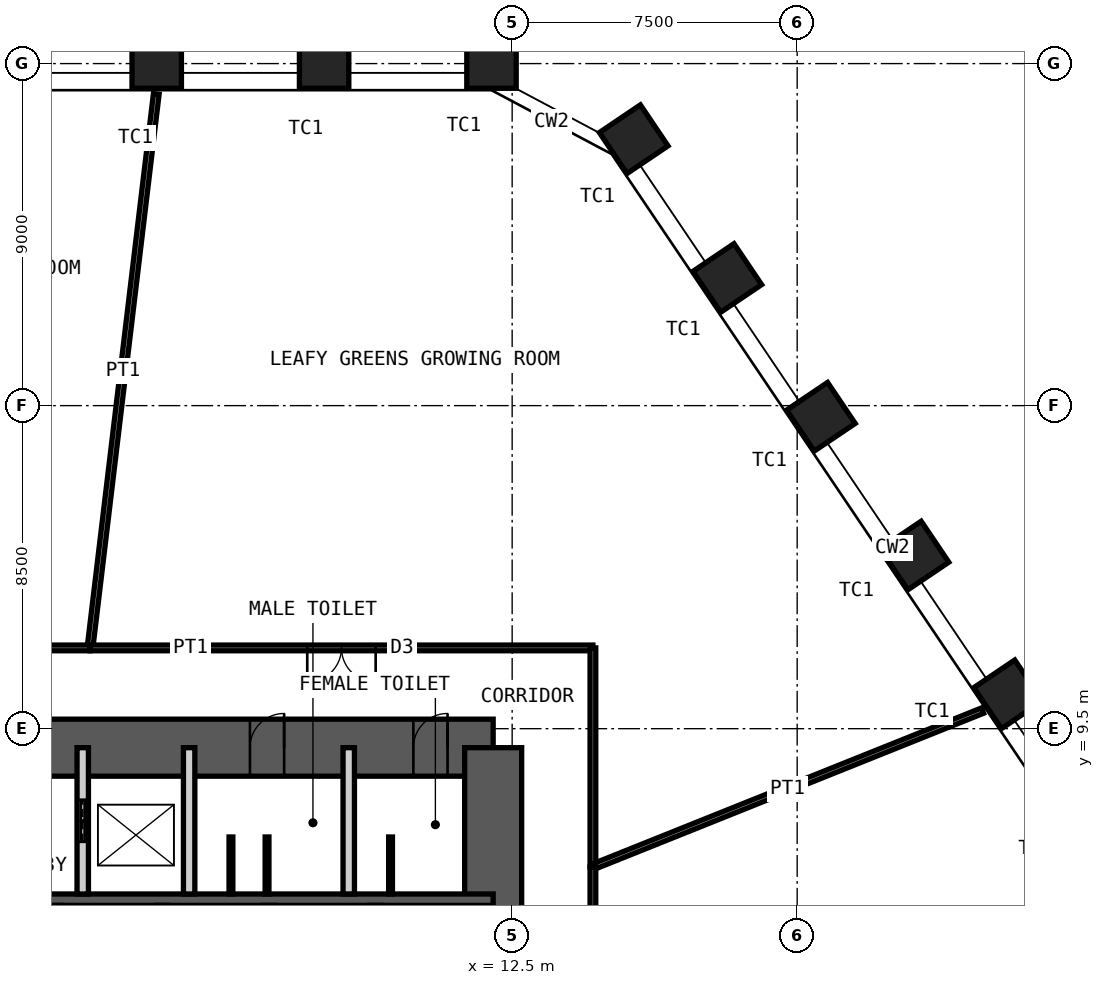
"""IFC4 building model, lengths in metres.
Left out: names, types, materials, properties, quantities, classifications, styles, units other than length and angle.
Written with IfcOpenShell. Run it as: python <this file> out.ifc"""

import sys

from ifc_helpers import new_model, si_unit, direction, frame, frame_2d, origin, origin_2d, place, context, subcontext, project, spatial, rectangle, hollow_rectangle, extrude, element, fill, save


model = new_model("IFC4")
c1 = context("Model", 3, precision=1e-05, world=origin(), true_north=direction((0.0, 1.0)))
c2 = subcontext(c1, "Body", "Model", "MODEL_VIEW")
j1 = project(units=[si_unit("LENGTHUNIT", "METRE"), si_unit("PLANEANGLEUNIT", "RADIAN")], contexts=[c1])
p1 = place(None, origin())
s1 = spatial("IfcSite", under=j1, at=p1, CompositionType="ELEMENT")
p2 = place(p1, origin())
s2 = spatial("IfcBuilding", under=s1, at=p2, CompositionType="ELEMENT")
p3 = place(p2, frame((0.0, 0.0, 37.0)))
s3 = spatial("IfcBuildingStorey", under=s2, at=p3, CompositionType="ELEMENT", Elevation=37.0)
for number, where, z_axis, x_axis in (
    (1, (3.147, 27.0, 0.0), (0.0, 0.0, 1.0), (-1.0, 0.0, 0.0)),
    (2, (7.552, 27.0, 0.0), (0.0, 0.0, 1.0), (-1.0, 0.0, 0.0)),
    (3, (11.956, 27.0, 0.0), (0.0, 0.0, 1.0), (-1.0, 0.0, 0.0)),
    (4, (15.698, 25.01, 0.0), (0.0, 0.0, 1.0), (-0.559, 0.829, 0.0)),
    (5, (18.161, 21.359, 0.0), (0.0, 0.0, 1.0), (-0.559, 0.829, 0.0)),
    (6, (20.624, 17.707, 0.0), (0.0, 0.0, 1.0), (-0.559, 0.829, 0.0)),
    (7, (23.087, 14.056, 0.0), (0.0, 0.0, 1.0), (-0.559, 0.829, 0.0)),
    (8, (25.55, 10.404, 0.0), (0.0, 0.0, 1.0), (-0.559, 0.829, 0.0)),
):
    element("IfcColumn", number, at=place(p3, frame(where, z_axis=z_axis, x_axis=x_axis)), inside=s3, PredefinedType="COLUMN", context=c2, shape_type="SweptSolid", body=[
        extrude(hollow_rectangle(XDim=1.3, YDim=1.3, WallThickness=0.1, at=origin_2d()), origin(), (0.0, 0.0, 1.0), 5.0),
    ])
p4 = place(p3, frame((-12.0, 9.0, 0.0), z_axis=(0.0, 0.0, 1.0), x_axis=(1.0, 0.0, 0.0)))
e9 = element("IfcWall", 9, at=p4, inside=s3, PredefinedType="SHEAR", context=c2, shape_type="SweptSolid", body=[
    extrude(rectangle(XDim=24.0, YDim=1.5, at=frame_2d((12.0, 0.0))), origin(), (0.0, 0.0, 1.0), 5.0),
])
p5 = place(p4, frame((10.4, 0.0, 0.0)))
e10 = element("IfcOpeningElement", 10, at=p5, cuts=e9, PredefinedType="OPENING", context=c2, shape_type="SweptSolid", body=[
    extrude(rectangle(XDim=1.0, YDim=2.1, at=frame_2d((0.5, 1.05))), frame((0.0, 0.76, 0.0), z_axis=(0.0, -1.0, 0.0), x_axis=(1.0, 0.0, 0.0)), (0.0, 0.0, 1.0), 1.52),
])
p6 = place(p4, frame((17.6, 0.0, 0.0)))
e11 = element("IfcOpeningElement", 11, at=p6, cuts=e9, PredefinedType="OPENING", context=c2, shape_type="SweptSolid", body=[
    extrude(rectangle(XDim=0.9, YDim=2.1, at=frame_2d((0.45, 1.05))), frame((0.0, 0.76, 0.0), z_axis=(0.0, -1.0, 0.0), x_axis=(1.0, 0.0, 0.0)), (0.0, 0.0, 1.0), 1.52),
])
p7 = place(p4, frame((21.9, 0.0, 0.0)))
e12 = element("IfcOpeningElement", 12, at=p7, cuts=e9, PredefinedType="OPENING", context=c2, shape_type="SweptSolid", body=[
    extrude(rectangle(XDim=0.9, YDim=2.1, at=frame_2d((0.45, 1.05))), frame((0.0, 0.76, 0.0), z_axis=(0.0, -1.0, 0.0), x_axis=(1.0, 0.0, 0.0)), (0.0, 0.0, 1.0), 1.52),
])
p8 = place(p3, frame((12.0, -9.0, 0.0), z_axis=(0.0, 0.0, 1.0), x_axis=(0.0, 1.0, 0.0)))
e13 = element("IfcWall", 13, at=p8, inside=s3, PredefinedType="SHEAR", context=c2, shape_type="SweptSolid", body=[
    extrude(rectangle(XDim=18.0, YDim=1.5, at=frame_2d((9.0, 0.0))), origin(), (0.0, 0.0, 1.0), 5.0),
])
p9 = place(p8, frame((8.1, 0.0, 0.0)))
e14 = element("IfcOpeningElement", 14, at=p9, cuts=e13, PredefinedType="OPENING", context=c2, shape_type="SweptSolid", body=[
    extrude(rectangle(XDim=1.8, YDim=2.1, at=frame_2d((0.9, 1.05))), frame((0.0, 0.76, 0.0), z_axis=(0.0, -1.0, 0.0), x_axis=(1.0, 0.0, 0.0)), (0.0, 0.0, 1.0), 1.52),
])
p10 = place(p3, frame((-12.0, 5.0, 0.0), z_axis=(0.0, 0.0, 1.0), x_axis=(1.0, 0.0, 0.0)))
e15 = element("IfcWall", 15, at=p10, inside=s3, PredefinedType="SHEAR", context=c2, shape_type="SweptSolid", body=[
    extrude(rectangle(XDim=24.0, YDim=0.3, at=frame_2d((12.0, 0.0))), origin(), (0.0, 0.0, 1.0), 5.0),
])
p11 = place(p3, frame((1.2, 5.15, 0.0), z_axis=(0.0, 0.0, 1.0), x_axis=(0.0, 1.0, 0.0)))
e16 = element("IfcWall", 16, at=p11, inside=s3, PredefinedType="PARTITIONING", context=c2, shape_type="SweptSolid", body=[
    extrude(rectangle(XDim=3.85, YDim=0.3, at=frame_2d((1.925, 0.0))), origin(), (0.0, 0.0, 1.0), 4.78),
])
p12 = place(p11, frame((1.375, 0.0, 0.0)))
e17 = element("IfcOpeningElement", 17, at=p12, cuts=e16, PredefinedType="OPENING", context=c2, shape_type="SweptSolid", body=[
    extrude(rectangle(XDim=1.1, YDim=2.4, at=frame_2d((0.55, 1.2))), frame((0.0, 0.16, 0.0), z_axis=(0.0, -1.0, 0.0), x_axis=(1.0, 0.0, 0.0)), (0.0, 0.0, 1.0), 0.32),
])
for number, where, z_axis, x_axis in (
    (18, (4.0, 5.15, 0.0), (0.0, 0.0, 1.0), (0.0, 1.0, 0.0)),
    (19, (8.2, 5.15, 0.0), (0.0, 0.0, 1.0), (0.0, 1.0, 0.0)),
):
    element("IfcWall", number, at=place(p3, frame(where, z_axis=z_axis, x_axis=x_axis)), inside=s3, PredefinedType="PARTITIONING", context=c2, shape_type="SweptSolid", body=[
        extrude(rectangle(XDim=3.85, YDim=0.3, at=frame_2d((1.925, 0.0))), origin(), (0.0, 0.0, 1.0), 4.78),
    ])
for number, where, z_axis, x_axis in (
    (20, (5.1, 5.15, 0.0), (0.0, 0.0, 1.0), (0.0, 1.0, 0.0)),
    (21, (6.05, 5.15, 0.0), (0.0, 0.0, 1.0), (0.0, 1.0, 0.0)),
    (22, (9.3, 5.15, 0.0), (0.0, 0.0, 1.0), (0.0, 1.0, 0.0)),
):
    element("IfcWall", number, at=place(p3, frame(where, z_axis=z_axis, x_axis=x_axis)), inside=s3, PredefinedType="PARTITIONING", context=c2, shape_type="SweptSolid", body=[
        extrude(rectangle(XDim=1.5, YDim=0.1, at=frame_2d((0.75, 0.0))), origin(), (0.0, 0.0, 1.0), 2.1),
    ])
p13 = place(p3, frame((3.135, 26.201, 0.0), z_axis=(0.0, 0.0, 1.0), x_axis=(-0.118796980211, -0.992918565388, 0.0)))
e23 = element("IfcWall", 23, at=p13, inside=s3, PredefinedType="PARTITIONING", context=c2, shape_type="SweptSolid", body=[
    extrude(rectangle(XDim=14.68, YDim=0.15, at=frame_2d((7.34, 0.0))), origin(), (0.0, 0.0, 1.0), 3.7),
])
p14 = place(p3, frame((1.391, 11.625, 0.0), z_axis=(0.0, 0.0, 1.0), x_axis=(1.0, 0.0, 0.0)))
e24 = element("IfcWall", 24, at=p14, inside=s3, PredefinedType="PARTITIONING", context=c2, shape_type="SweptSolid", body=[
    extrude(rectangle(XDim=13.234, YDim=0.15, at=frame_2d((6.617, 0.0))), origin(), (0.0, 0.0, 1.0), 4.8),
])
p15 = place(p14, frame((5.717, 0.0, 0.0)))
e25 = element("IfcOpeningElement", 25, at=p15, cuts=e24, PredefinedType="OPENING", context=c2, shape_type="SweptSolid", body=[
    extrude(rectangle(XDim=1.8, YDim=2.4, at=frame_2d((0.9, 1.2))), frame((0.0, 0.085, 0.0), z_axis=(0.0, -1.0, 0.0), x_axis=(1.0, 0.0, 0.0)), (0.0, 0.0, 1.0), 0.17),
])
p16 = place(p3, frame((14.625, 11.625, 0.0), z_axis=(0.0, 0.0, 1.0), x_axis=(0.0, -1.0, 0.0)))
e26 = element("IfcWall", 26, at=p16, inside=s3, PredefinedType="PARTITIONING", context=c2, shape_type="SweptSolid", body=[
    extrude(rectangle(XDim=5.761, YDim=0.15, at=frame_2d((2.88, 0.0))), origin(), (0.0, 0.0, 1.0), 4.8),
])
p17 = place(p3, frame((24.877, 9.975, 0.0), z_axis=(0.0, 0.0, 1.0), x_axis=(-0.928157765849, -0.372186998288, 0.0)))
e27 = element("IfcWall", 27, at=p17, inside=s3, PredefinedType="PARTITIONING", context=c2, shape_type="SweptSolid", body=[
    extrude(rectangle(XDim=11.046, YDim=0.15, at=frame_2d((5.523, 0.0))), origin(), (0.0, 0.0, 1.0), 3.7),
])
p18 = place(p3, frame((14.625, 5.864, 0.0), z_axis=(0.0, 0.0, 1.0), x_axis=(0.0, -1.0, 0.0)))
e28 = element("IfcWall", 28, at=p18, inside=s3, PredefinedType="PARTITIONING", context=c2, shape_type="SweptSolid", body=[
    extrude(rectangle(XDim=8.195, YDim=0.15, at=frame_2d((4.097, 0.0))), origin(), (0.0, 0.0, 1.0), 4.8),
])
p19 = place(p18, frame((3.198, 0.0, 0.0)))
e29 = element("IfcOpeningElement", 29, at=p19, cuts=e28, PredefinedType="OPENING", context=c2, shape_type="SweptSolid", body=[
    extrude(rectangle(XDim=1.8, YDim=2.4, at=frame_2d((0.9, 1.2))), frame((0.0, 0.085, 0.0), z_axis=(0.0, -1.0, 0.0), x_axis=(1.0, 0.0, 0.0)), (0.0, 0.0, 1.0), 0.17),
])
p20 = place(p3, frame((-4.45, 11.625, 0.0), z_axis=(0.0, 0.0, 1.0), x_axis=(1.0, 0.0, 0.0)))
e30 = element("IfcWall", 30, at=p20, inside=s3, PredefinedType="PARTITIONING", context=c2, shape_type="SweptSolid", body=[
    extrude(rectangle(XDim=5.841, YDim=0.15, at=frame_2d((2.92, 0.0))), origin(), (0.0, 0.0, 1.0), 4.8),
])
p21 = place(p20, frame((2.02, 0.0, 0.0)))
e31 = element("IfcOpeningElement", 31, at=p21, cuts=e30, PredefinedType="OPENING", context=c2, shape_type="SweptSolid", body=[
    extrude(rectangle(XDim=1.8, YDim=2.4, at=frame_2d((0.9, 1.2))), frame((0.0, 0.085, 0.0), z_axis=(0.0, -1.0, 0.0), x_axis=(1.0, 0.0, 0.0)), (0.0, 0.0, 1.0), 0.17),
])
p22 = place(p6, origin())
e32 = element("IfcDoor", 32, at=p22, inside=s3, OperationType="SINGLE_SWING_LEFT", PredefinedType="DOOR", context=c2, shape_type="SweptSolid", body=[
    extrude(rectangle(XDim=0.9, YDim=2.1, at=frame_2d((0.45, 1.05))), frame((0.0, 0.025, 0.0), z_axis=(0.0, -1.0, 0.0), x_axis=(1.0, 0.0, 0.0)), (0.0, 0.0, 1.0), 0.05),
])
fill(e11, e32)
p23 = place(p7, origin())
e33 = element("IfcDoor", 33, at=p23, inside=s3, OperationType="SINGLE_SWING_LEFT", PredefinedType="DOOR", context=c2, shape_type="SweptSolid", body=[
    extrude(rectangle(XDim=0.9, YDim=2.1, at=frame_2d((0.45, 1.05))), frame((0.0, 0.025, 0.0), z_axis=(0.0, -1.0, 0.0), x_axis=(1.0, 0.0, 0.0)), (0.0, 0.0, 1.0), 0.05),
])
fill(e12, e33)
p24 = place(p12, origin())
e34 = element("IfcDoor", 34, at=p24, inside=s3, OperationType="DOUBLE_DOOR_SLIDING", PredefinedType="DOOR", context=c2, shape_type="SweptSolid", body=[
    extrude(rectangle(XDim=1.1, YDim=2.4, at=frame_2d((0.55, 1.2))), frame((0.0, 0.025, 0.0), z_axis=(0.0, -1.0, 0.0), x_axis=(1.0, 0.0, 0.0)), (0.0, 0.0, 1.0), 0.05),
])
fill(e17, e34)
p25 = place(p15, origin())
e35 = element("IfcDoor", 35, at=p25, inside=s3, OperationType="DOUBLE_DOOR_DOUBLE_SWING", PredefinedType="DOOR", context=c2, shape_type="SweptSolid", body=[
    extrude(rectangle(XDim=1.8, YDim=2.4, at=frame_2d((0.9, 1.2))), frame((0.0, 0.025, 0.0), z_axis=(0.0, -1.0, 0.0), x_axis=(1.0, 0.0, 0.0)), (0.0, 0.0, 1.0), 0.05),
])
fill(e25, e35)
save(model, sys.argv[1])
